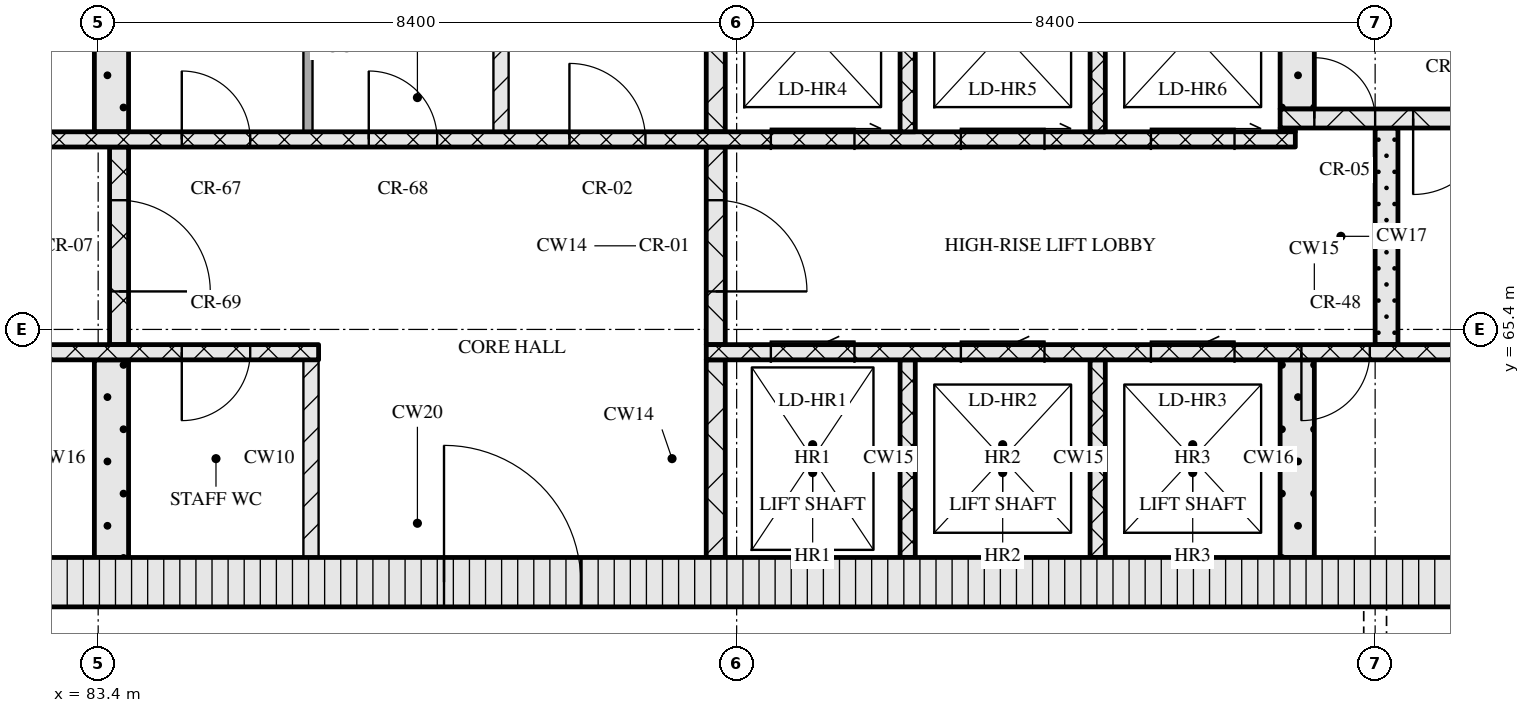
"""IFC4 building model, lengths in metres.
Left out: names, types, materials, properties, quantities, classifications, styles, units other than length and angle.
Written with IfcOpenShell. Run it as: python <this file> out.ifc"""

import sys

from ifc_helpers import new_model, si_unit, direction, frame, frame_2d, origin, place, context, subcontext, project, spatial, rectangle, extrude, element, fill, save


model = new_model("IFC4")
c1 = context("Model", 3, precision=1e-05, world=origin(), true_north=direction((0.0, 1.0)))
c2 = subcontext(c1, "Body", "Model", "MODEL_VIEW")
j1 = project(units=[si_unit("LENGTHUNIT", "METRE"), si_unit("PLANEANGLEUNIT", "RADIAN")], contexts=[c1])
p1 = place(None, origin())
s1 = spatial("IfcSite", under=j1, at=p1, CompositionType="ELEMENT")
p2 = place(p1, origin())
s2 = spatial("IfcBuilding", under=s1, at=p2, CompositionType="ELEMENT")
p3 = place(p2, frame((0.0, 0.0, 234.3)))
s3 = spatial("IfcBuildingStorey", under=s2, at=p3, CompositionType="ELEMENT", Elevation=234.3)
p4 = place(p3, frame((67.15, 62.075, 0.0), z_axis=(0.0, 0.0, 1.0), x_axis=(1.0, 0.0, 0.0)))
e1 = element("IfcWall", 1, at=p4, inside=s3, PredefinedType="SOLIDWALL", context=c2, shape_type="SweptSolid", body=[
    extrude(rectangle(XDim=40.9, YDim=0.65, at=frame_2d((20.45, 0.0))), origin(), (0.0, 0.0, 1.0), 3.32),
])
p5 = place(p4, frame((20.8, 0.0, 0.0)))
e2 = element("IfcOpeningElement", 2, at=p5, cuts=e1, PredefinedType="OPENING", context=c2, shape_type="SweptSolid", body=[
    extrude(rectangle(XDim=1.8, YDim=2.1, at=frame_2d((0.9, 1.05))), frame((0.0, 0.335, 0.0), z_axis=(0.0, -1.0, 0.0), x_axis=(1.0, 0.0, 0.0)), (0.0, 0.0, 1.0), 0.67),
])
p6 = place(p3, frame((83.575, 62.4, 0.0), z_axis=(0.0, 0.0, 1.0), x_axis=(0.0, 1.0, 0.0)))
e3 = element("IfcWall", 3, at=p6, inside=s3, PredefinedType="SOLIDWALL", context=c2, shape_type="SweptSolid", body=[
    extrude(rectangle(XDim=2.6, YDim=0.45, at=frame_2d((1.3, 0.0))), origin(), (0.0, 0.0, 1.0), 3.32),
])
p7 = place(p3, frame((86.2, 62.4, 0.0), z_axis=(0.0, 0.0, 1.0), x_axis=(0.0, 1.0, 0.0)))
e4 = element("IfcWall", 4, at=p7, inside=s3, PredefinedType="PARTITIONING", context=c2, shape_type="SweptSolid", body=[
    extrude(rectangle(XDim=2.6, YDim=0.2, at=frame_2d((1.3, 0.0))), origin(), (0.0, 0.0, 1.0), 3.32),
])
p8 = place(p3, frame((91.525, 62.4, 0.0), z_axis=(0.0, 0.0, 1.0), x_axis=(0.0, 1.0, 0.0)))
e5 = element("IfcWall", 5, at=p8, inside=s3, PredefinedType="SOLIDWALL", context=c2, shape_type="SweptSolid", body=[
    extrude(rectangle(XDim=2.6, YDim=0.25, at=frame_2d((1.3, 0.0))), origin(), (0.0, 0.0, 1.0), 3.32),
])
for number, where, z_axis, x_axis in (
    (6, (94.05, 62.4, 0.0), (0.0, 0.0, 1.0), (0.0, 1.0, 0.0)),
    (7, (96.55, 62.4, 0.0), (0.0, 0.0, 1.0), (0.0, 1.0, 0.0)),
):
    element("IfcWall", number, at=place(p3, frame(where, z_axis=z_axis, x_axis=x_axis)), inside=s3, PredefinedType="SOLIDWALL", context=c2, shape_type="SweptSolid", body=[
        extrude(rectangle(XDim=2.6, YDim=0.2, at=frame_2d((1.3, 0.0))), origin(), (0.0, 0.0, 1.0), 3.32),
    ])
p9 = place(p3, frame((99.175, 62.4, 0.0), z_axis=(0.0, 0.0, 1.0), x_axis=(0.0, 1.0, 0.0)))
e8 = element("IfcWall", 8, at=p9, inside=s3, PredefinedType="SOLIDWALL", context=c2, shape_type="SweptSolid", body=[
    extrude(rectangle(XDim=2.6, YDim=0.45, at=frame_2d((1.3, 0.0))), origin(), (0.0, 0.0, 1.0), 3.32),
])
p10 = place(p3, frame((67.8, 65.1, 0.0), z_axis=(0.0, 0.0, 1.0), x_axis=(1.0, 0.0, 0.0)))
e9 = element("IfcWall", 9, at=p10, inside=s3, PredefinedType="SOLIDWALL", context=c2, shape_type="SweptSolid", body=[
    extrude(rectangle(XDim=18.5, YDim=0.2, at=frame_2d((9.25, 0.0))), origin(), (0.0, 0.0, 1.0), 3.32),
])
p11 = place(p10, frame((7.27, 0.0, 0.0)))
e10 = element("IfcOpeningElement", 10, at=p11, cuts=e9, PredefinedType="OPENING", context=c2, shape_type="SweptSolid", body=[
    extrude(rectangle(XDim=0.9, YDim=2.1, at=frame_2d((0.45, 1.05))), frame((0.0, 0.11, 0.0), z_axis=(0.0, -1.0, 0.0), x_axis=(1.0, 0.0, 0.0)), (0.0, 0.0, 1.0), 0.22),
])
p12 = place(p10, frame((9.05, 0.0, 0.0)))
e11 = element("IfcOpeningElement", 11, at=p12, cuts=e9, PredefinedType="OPENING", context=c2, shape_type="SweptSolid", body=[
    extrude(rectangle(XDim=0.9, YDim=2.1, at=frame_2d((0.45, 1.05))), frame((0.0, 0.11, 0.0), z_axis=(0.0, -1.0, 0.0), x_axis=(1.0, 0.0, 0.0)), (0.0, 0.0, 1.0), 0.22),
])
p13 = place(p10, frame((12.76, 0.0, 0.0)))
e12 = element("IfcOpeningElement", 12, at=p13, cuts=e9, PredefinedType="OPENING", context=c2, shape_type="SweptSolid", body=[
    extrude(rectangle(XDim=0.9, YDim=2.1, at=frame_2d((0.45, 1.05))), frame((0.0, 0.11, 0.0), z_axis=(0.0, -1.0, 0.0), x_axis=(1.0, 0.0, 0.0)), (0.0, 0.0, 1.0), 0.22),
])
p14 = place(p10, frame((16.7, 0.0, 0.0)))
e13 = element("IfcOpeningElement", 13, at=p14, cuts=e9, PredefinedType="OPENING", context=c2, shape_type="SweptSolid", body=[
    extrude(rectangle(XDim=0.9, YDim=2.1, at=frame_2d((0.45, 1.05))), frame((0.0, 0.11, 0.0), z_axis=(0.0, -1.0, 0.0), x_axis=(1.0, 0.0, 0.0)), (0.0, 0.0, 1.0), 0.22),
])
p15 = place(p3, frame((91.4, 65.1, 0.0), z_axis=(0.0, 0.0, 1.0), x_axis=(1.0, 0.0, 0.0)))
e14 = element("IfcWall", 14, at=p15, inside=s3, PredefinedType="SOLIDWALL", context=c2, shape_type="SweptSolid", body=[
    extrude(rectangle(XDim=16.0, YDim=0.2, at=frame_2d((8.0, 0.0))), origin(), (0.0, 0.0, 1.0), 3.32),
])
p16 = place(p15, frame((0.85, 0.0, 0.0)))
e15 = element("IfcOpeningElement", 15, at=p16, cuts=e14, PredefinedType="OPENING", context=c2, shape_type="SweptSolid", body=[
    extrude(rectangle(XDim=1.1, YDim=2.1, at=frame_2d((0.55, 1.05))), frame((0.0, 0.11, 0.0), z_axis=(0.0, -1.0, 0.0), x_axis=(1.0, 0.0, 0.0)), (0.0, 0.0, 1.0), 0.22),
])
p17 = place(p15, frame((3.35, 0.0, 0.0)))
e16 = element("IfcOpeningElement", 16, at=p17, cuts=e14, PredefinedType="OPENING", context=c2, shape_type="SweptSolid", body=[
    extrude(rectangle(XDim=1.1, YDim=2.1, at=frame_2d((0.55, 1.05))), frame((0.0, 0.11, 0.0), z_axis=(0.0, -1.0, 0.0), x_axis=(1.0, 0.0, 0.0)), (0.0, 0.0, 1.0), 0.22),
])
p18 = place(p15, frame((5.85, 0.0, 0.0)))
e17 = element("IfcOpeningElement", 17, at=p18, cuts=e14, PredefinedType="OPENING", context=c2, shape_type="SweptSolid", body=[
    extrude(rectangle(XDim=1.1, YDim=2.1, at=frame_2d((0.55, 1.05))), frame((0.0, 0.11, 0.0), z_axis=(0.0, -1.0, 0.0), x_axis=(1.0, 0.0, 0.0)), (0.0, 0.0, 1.0), 0.22),
])
p19 = place(p15, frame((7.83, 0.0, 0.0)))
e18 = element("IfcOpeningElement", 18, at=p19, cuts=e14, PredefinedType="OPENING", context=c2, shape_type="SweptSolid", body=[
    extrude(rectangle(XDim=0.9, YDim=2.1, at=frame_2d((0.45, 1.05))), frame((0.0, 0.11, 0.0), z_axis=(0.0, -1.0, 0.0), x_axis=(1.0, 0.0, 0.0)), (0.0, 0.0, 1.0), 0.22),
])
p20 = place(p3, frame((83.675, 65.2, 0.0), z_axis=(0.0, 0.0, 1.0), x_axis=(0.0, 1.0, 0.0)))
e19 = element("IfcWall", 19, at=p20, inside=s3, PredefinedType="SOLIDWALL", context=c2, shape_type="SweptSolid", body=[
    extrude(rectangle(XDim=2.6, YDim=0.25, at=frame_2d((1.3, 0.0))), origin(), (0.0, 0.0, 1.0), 3.32),
])
p21 = place(p20, frame((0.7, 0.0, 0.0)))
e20 = element("IfcOpeningElement", 20, at=p21, cuts=e19, PredefinedType="OPENING", context=c2, shape_type="SweptSolid", body=[
    extrude(rectangle(XDim=1.2, YDim=2.1, at=frame_2d((0.6, 1.05))), frame((0.0, 0.135, 0.0), z_axis=(0.0, -1.0, 0.0), x_axis=(1.0, 0.0, 0.0)), (0.0, 0.0, 1.0), 0.27),
])
p22 = place(p3, frame((91.525, 65.2, 0.0), z_axis=(0.0, 0.0, 1.0), x_axis=(0.0, 1.0, 0.0)))
e21 = element("IfcWall", 21, at=p22, inside=s3, PredefinedType="SOLIDWALL", context=c2, shape_type="SweptSolid", body=[
    extrude(rectangle(XDim=2.6, YDim=0.25, at=frame_2d((1.3, 0.0))), origin(), (0.0, 0.0, 1.0), 3.32),
])
p23 = place(p22, frame((0.7, 0.0, 0.0)))
e22 = element("IfcOpeningElement", 22, at=p23, cuts=e21, PredefinedType="OPENING", context=c2, shape_type="SweptSolid", body=[
    extrude(rectangle(XDim=1.2, YDim=2.1, at=frame_2d((0.6, 1.05))), frame((0.0, 0.135, 0.0), z_axis=(0.0, -1.0, 0.0), x_axis=(1.0, 0.0, 0.0)), (0.0, 0.0, 1.0), 0.27),
])
p24 = place(p3, frame((100.35, 65.2, 0.0), z_axis=(0.0, 0.0, 1.0), x_axis=(0.0, 1.0, 0.0)))
e23 = element("IfcWall", 23, at=p24, inside=s3, PredefinedType="SOLIDWALL", context=c2, shape_type="SweptSolid", body=[
    extrude(rectangle(XDim=2.85, YDim=0.3, at=frame_2d((1.425, 0.0))), origin(), (0.0, 0.0, 1.0), 3.32),
])
p25 = place(p3, frame((76.05, 67.9, 0.0), z_axis=(0.0, 0.0, 1.0), x_axis=(1.0, 0.0, 0.0)))
e24 = element("IfcWall", 24, at=p25, inside=s3, PredefinedType="SOLIDWALL", context=c2, shape_type="SweptSolid", body=[
    extrude(rectangle(XDim=23.1, YDim=0.2, at=frame_2d((11.55, 0.0))), origin(), (0.0, 0.0, 1.0), 3.32),
])
p26 = place(p25, frame((1.35, 0.0, 0.0)))
e25 = element("IfcOpeningElement", 25, at=p26, cuts=e24, PredefinedType="OPENING", context=c2, shape_type="SweptSolid", body=[
    extrude(rectangle(XDim=0.9, YDim=2.1, at=frame_2d((0.45, 1.05))), frame((0.0, 0.11, 0.0), z_axis=(0.0, -1.0, 0.0), x_axis=(1.0, 0.0, 0.0)), (0.0, 0.0, 1.0), 0.22),
])
p27 = place(p25, frame((5.06, 0.0, 0.0)))
e26 = element("IfcOpeningElement", 26, at=p27, cuts=e24, PredefinedType="OPENING", context=c2, shape_type="SweptSolid", body=[
    extrude(rectangle(XDim=0.9, YDim=2.1, at=frame_2d((0.45, 1.05))), frame((0.0, 0.11, 0.0), z_axis=(0.0, -1.0, 0.0), x_axis=(1.0, 0.0, 0.0)), (0.0, 0.0, 1.0), 0.22),
])
p28 = place(p25, frame((8.45, 0.0, 0.0)))
e27 = element("IfcOpeningElement", 27, at=p28, cuts=e24, PredefinedType="OPENING", context=c2, shape_type="SweptSolid", body=[
    extrude(rectangle(XDim=0.9, YDim=2.1, at=frame_2d((0.45, 1.05))), frame((0.0, 0.11, 0.0), z_axis=(0.0, -1.0, 0.0), x_axis=(1.0, 0.0, 0.0)), (0.0, 0.0, 1.0), 0.22),
])
p29 = place(p25, frame((10.91, 0.0, 0.0)))
e28 = element("IfcOpeningElement", 28, at=p29, cuts=e24, PredefinedType="OPENING", context=c2, shape_type="SweptSolid", body=[
    extrude(rectangle(XDim=0.9, YDim=2.1, at=frame_2d((0.45, 1.05))), frame((0.0, 0.11, 0.0), z_axis=(0.0, -1.0, 0.0), x_axis=(1.0, 0.0, 0.0)), (0.0, 0.0, 1.0), 0.22),
])
p30 = place(p25, frame((13.55, 0.0, 0.0)))
e29 = element("IfcOpeningElement", 29, at=p30, cuts=e24, PredefinedType="OPENING", context=c2, shape_type="SweptSolid", body=[
    extrude(rectangle(XDim=1.0, YDim=2.1, at=frame_2d((0.5, 1.05))), frame((0.0, 0.11, 0.0), z_axis=(0.0, -1.0, 0.0), x_axis=(1.0, 0.0, 0.0)), (0.0, 0.0, 1.0), 0.22),
])
p31 = place(p25, frame((16.2, 0.0, 0.0)))
e30 = element("IfcOpeningElement", 30, at=p31, cuts=e24, PredefinedType="OPENING", context=c2, shape_type="SweptSolid", body=[
    extrude(rectangle(XDim=1.1, YDim=2.1, at=frame_2d((0.55, 1.05))), frame((0.0, 0.11, 0.0), z_axis=(0.0, -1.0, 0.0), x_axis=(1.0, 0.0, 0.0)), (0.0, 0.0, 1.0), 0.22),
])
p32 = place(p25, frame((18.7, 0.0, 0.0)))
e31 = element("IfcOpeningElement", 31, at=p32, cuts=e24, PredefinedType="OPENING", context=c2, shape_type="SweptSolid", body=[
    extrude(rectangle(XDim=1.1, YDim=2.1, at=frame_2d((0.55, 1.05))), frame((0.0, 0.11, 0.0), z_axis=(0.0, -1.0, 0.0), x_axis=(1.0, 0.0, 0.0)), (0.0, 0.0, 1.0), 0.22),
])
p33 = place(p25, frame((21.2, 0.0, 0.0)))
e32 = element("IfcOpeningElement", 32, at=p33, cuts=e24, PredefinedType="OPENING", context=c2, shape_type="SweptSolid", body=[
    extrude(rectangle(XDim=1.1, YDim=2.1, at=frame_2d((0.55, 1.05))), frame((0.0, 0.11, 0.0), z_axis=(0.0, -1.0, 0.0), x_axis=(1.0, 0.0, 0.0)), (0.0, 0.0, 1.0), 0.22),
])
p34 = place(p3, frame((83.575, 68.0, 0.0), z_axis=(0.0, 0.0, 1.0), x_axis=(0.0, 1.0, 0.0)))
e33 = element("IfcWall", 33, at=p34, inside=s3, PredefinedType="SOLIDWALL", context=c2, shape_type="SweptSolid", body=[
    extrude(rectangle(XDim=2.6, YDim=0.45, at=frame_2d((1.3, 0.0))), origin(), (0.0, 0.0, 1.0), 3.32),
])
p35 = place(p3, frame((86.16, 68.0, 0.0), z_axis=(0.0, 0.0, 1.0), x_axis=(0.0, 1.0, 0.0)))
e34 = element("IfcWall", 34, at=p35, inside=s3, PredefinedType="PARTITIONING", context=c2, shape_type="SweptSolid", body=[
    extrude(rectangle(XDim=2.6, YDim=0.12, at=frame_2d((1.3, 0.0))), origin(), (0.0, 0.0, 1.0), 3.32),
])
p36 = place(p3, frame((88.7, 68.0, 0.0), z_axis=(0.0, 0.0, 1.0), x_axis=(0.0, 1.0, 0.0)))
e35 = element("IfcWall", 35, at=p36, inside=s3, PredefinedType="PARTITIONING", context=c2, shape_type="SweptSolid", body=[
    extrude(rectangle(XDim=2.6, YDim=0.2, at=frame_2d((1.3, 0.0))), origin(), (0.0, 0.0, 1.0), 3.32),
])
p37 = place(p3, frame((91.525, 68.0, 0.0), z_axis=(0.0, 0.0, 1.0), x_axis=(0.0, 1.0, 0.0)))
e36 = element("IfcWall", 36, at=p37, inside=s3, PredefinedType="SOLIDWALL", context=c2, shape_type="SweptSolid", body=[
    extrude(rectangle(XDim=2.6, YDim=0.25, at=frame_2d((1.3, 0.0))), origin(), (0.0, 0.0, 1.0), 3.32),
])
for number, where, z_axis, x_axis in (
    (37, (94.05, 68.0, 0.0), (0.0, 0.0, 1.0), (0.0, 1.0, 0.0)),
    (38, (96.55, 68.0, 0.0), (0.0, 0.0, 1.0), (0.0, 1.0, 0.0)),
):
    element("IfcWall", number, at=place(p3, frame(where, z_axis=z_axis, x_axis=x_axis)), inside=s3, PredefinedType="SOLIDWALL", context=c2, shape_type="SweptSolid", body=[
        extrude(rectangle(XDim=2.6, YDim=0.2, at=frame_2d((1.3, 0.0))), origin(), (0.0, 0.0, 1.0), 3.32),
    ])
p38 = place(p3, frame((98.95, 68.025, 0.0), z_axis=(0.0, 0.0, 1.0), x_axis=(1.0, 0.0, 0.0)))
e39 = element("IfcWall", 39, at=p38, inside=s3, PredefinedType="SOLIDWALL", context=c2, shape_type="SweptSolid", body=[
    extrude(rectangle(XDim=0.2, YDim=0.05, at=frame_2d((0.1, 0.0))), origin(), (0.0, 0.0, 1.0), 3.32),
])
p39 = place(p3, frame((98.95, 68.175, 0.0), z_axis=(0.0, 0.0, 1.0), x_axis=(1.0, 0.0, 0.0)))
e40 = element("IfcWall", 40, at=p39, inside=s3, PredefinedType="SOLIDWALL", context=c2, shape_type="SweptSolid", body=[
    extrude(rectangle(XDim=8.45, YDim=0.25, at=frame_2d((4.225, 0.0))), origin(), (0.0, 0.0, 1.0), 3.32),
])
p40 = place(p39, frame((0.45, 0.0, 0.0)))
e41 = element("IfcOpeningElement", 41, at=p40, cuts=e40, PredefinedType="OPENING", context=c2, shape_type="SweptSolid", body=[
    extrude(rectangle(XDim=0.8, YDim=2.1, at=frame_2d((0.4, 1.05))), frame((0.0, 0.135, 0.0), z_axis=(0.0, -1.0, 0.0), x_axis=(1.0, 0.0, 0.0)), (0.0, 0.0, 1.0), 0.27),
])
p41 = place(p39, frame((1.75, 0.0, 0.0)))
e42 = element("IfcOpeningElement", 42, at=p41, cuts=e40, PredefinedType="OPENING", context=c2, shape_type="SweptSolid", body=[
    extrude(rectangle(XDim=1.0, YDim=2.1, at=frame_2d((0.5, 1.05))), frame((0.0, 0.135, 0.0), z_axis=(0.0, -1.0, 0.0), x_axis=(1.0, 0.0, 0.0)), (0.0, 0.0, 1.0), 0.27),
])
p42 = place(p3, frame((99.175, 68.3, 0.0), z_axis=(0.0, 0.0, 1.0), x_axis=(0.0, 1.0, 0.0)))
e43 = element("IfcWall", 43, at=p42, inside=s3, PredefinedType="SOLIDWALL", context=c2, shape_type="SweptSolid", body=[
    extrude(rectangle(XDim=2.3, YDim=0.45, at=frame_2d((1.15, 0.0))), origin(), (0.0, 0.0, 1.0), 3.32),
])
p43 = place(p5, origin())
e44 = element("IfcDoor", 44, at=p43, inside=s3, OperationType="DOUBLE_DOOR_SINGLE_SWING", PredefinedType="DOOR", context=c2, shape_type="SweptSolid", body=[
    extrude(rectangle(XDim=1.8, YDim=2.1, at=frame_2d((0.9, 1.05))), frame((0.0, 0.025, 0.0), z_axis=(0.0, -1.0, 0.0), x_axis=(1.0, 0.0, 0.0)), (0.0, 0.0, 1.0), 0.05),
])
fill(e2, e44)
p44 = place(p14, origin())
e45 = element("IfcDoor", 45, at=p44, inside=s3, OperationType="SINGLE_SWING_RIGHT", PredefinedType="DOOR", context=c2, shape_type="SweptSolid", body=[
    extrude(rectangle(XDim=0.9, YDim=2.1, at=frame_2d((0.45, 1.05))), frame((0.0, 0.025, 0.0), z_axis=(0.0, -1.0, 0.0), x_axis=(1.0, 0.0, 0.0)), (0.0, 0.0, 1.0), 0.05),
])
fill(e13, e45)
p45 = place(p16, origin())
e46 = element("IfcDoor", 46, at=p45, inside=s3, OperationType="SLIDING_TO_LEFT", PredefinedType="DOOR", context=c2, shape_type="SweptSolid", body=[
    extrude(rectangle(XDim=1.1, YDim=2.1, at=frame_2d((0.55, 1.05))), frame((0.0, 0.025, 0.0), z_axis=(0.0, -1.0, 0.0), x_axis=(1.0, 0.0, 0.0)), (0.0, 0.0, 1.0), 0.05),
])
fill(e15, e46)
p46 = place(p17, origin())
e47 = element("IfcDoor", 47, at=p46, inside=s3, OperationType="SLIDING_TO_LEFT", PredefinedType="DOOR", context=c2, shape_type="SweptSolid", body=[
    extrude(rectangle(XDim=1.1, YDim=2.1, at=frame_2d((0.55, 1.05))), frame((0.0, 0.025, 0.0), z_axis=(0.0, -1.0, 0.0), x_axis=(1.0, 0.0, 0.0)), (0.0, 0.0, 1.0), 0.05),
])
fill(e16, e47)
p47 = place(p18, origin())
e48 = element("IfcDoor", 48, at=p47, inside=s3, OperationType="SLIDING_TO_LEFT", PredefinedType="DOOR", context=c2, shape_type="SweptSolid", body=[
    extrude(rectangle(XDim=1.1, YDim=2.1, at=frame_2d((0.55, 1.05))), frame((0.0, 0.025, 0.0), z_axis=(0.0, -1.0, 0.0), x_axis=(1.0, 0.0, 0.0)), (0.0, 0.0, 1.0), 0.05),
])
fill(e17, e48)
p48 = place(p19, origin())
e49 = element("IfcDoor", 49, at=p48, inside=s3, OperationType="SINGLE_SWING_RIGHT", PredefinedType="DOOR", context=c2, shape_type="SweptSolid", body=[
    extrude(rectangle(XDim=0.9, YDim=2.1, at=frame_2d((0.45, 1.05))), frame((0.0, 0.025, 0.0), z_axis=(0.0, -1.0, 0.0), x_axis=(1.0, 0.0, 0.0)), (0.0, 0.0, 1.0), 0.05),
])
fill(e18, e49)
p49 = place(p21, origin())
e50 = element("IfcDoor", 50, at=p49, inside=s3, OperationType="SINGLE_SWING_RIGHT", PredefinedType="DOOR", context=c2, shape_type="SweptSolid", body=[
    extrude(rectangle(XDim=1.2, YDim=2.1, at=frame_2d((0.6, 1.05))), frame((0.0, 0.025, 0.0), z_axis=(0.0, -1.0, 0.0), x_axis=(1.0, 0.0, 0.0)), (0.0, 0.0, 1.0), 0.05),
])
fill(e20, e50)
p50 = place(p23, origin())
e51 = element("IfcDoor", 51, at=p50, inside=s3, OperationType="SINGLE_SWING_RIGHT", PredefinedType="DOOR", context=c2, shape_type="SweptSolid", body=[
    extrude(rectangle(XDim=1.2, YDim=2.1, at=frame_2d((0.6, 1.05))), frame((0.0, 0.025, 0.0), z_axis=(0.0, -1.0, 0.0), x_axis=(1.0, 0.0, 0.0)), (0.0, 0.0, 1.0), 0.05),
])
fill(e22, e51)
p51 = place(p28, origin())
e52 = element("IfcDoor", 52, at=p51, inside=s3, OperationType="SINGLE_SWING_LEFT", PredefinedType="DOOR", context=c2, shape_type="SweptSolid", body=[
    extrude(rectangle(XDim=0.9, YDim=2.1, at=frame_2d((0.45, 1.05))), frame((0.0, 0.025, 0.0), z_axis=(0.0, -1.0, 0.0), x_axis=(1.0, 0.0, 0.0)), (0.0, 0.0, 1.0), 0.05),
])
fill(e27, e52)
p52 = place(p29, origin())
e53 = element("IfcDoor", 53, at=p52, inside=s3, OperationType="SINGLE_SWING_LEFT", PredefinedType="DOOR", context=c2, shape_type="SweptSolid", body=[
    extrude(rectangle(XDim=0.9, YDim=2.1, at=frame_2d((0.45, 1.05))), frame((0.0, 0.025, 0.0), z_axis=(0.0, -1.0, 0.0), x_axis=(1.0, 0.0, 0.0)), (0.0, 0.0, 1.0), 0.05),
])
fill(e28, e53)
p53 = place(p30, origin())
e54 = element("IfcDoor", 54, at=p53, inside=s3, OperationType="SINGLE_SWING_LEFT", PredefinedType="DOOR", context=c2, shape_type="SweptSolid", body=[
    extrude(rectangle(XDim=1.0, YDim=2.1, at=frame_2d((0.5, 1.05))), frame((0.0, 0.025, 0.0), z_axis=(0.0, -1.0, 0.0), x_axis=(1.0, 0.0, 0.0)), (0.0, 0.0, 1.0), 0.05),
])
fill(e29, e54)
p54 = place(p31, origin())
e55 = element("IfcDoor", 55, at=p54, inside=s3, OperationType="SLIDING_TO_RIGHT", PredefinedType="DOOR", context=c2, shape_type="SweptSolid", body=[
    extrude(rectangle(XDim=1.1, YDim=2.1, at=frame_2d((0.55, 1.05))), frame((0.0, 0.025, 0.0), z_axis=(0.0, -1.0, 0.0), x_axis=(1.0, 0.0, 0.0)), (0.0, 0.0, 1.0), 0.05),
])
fill(e30, e55)
p55 = place(p32, origin())
e56 = element("IfcDoor", 56, at=p55, inside=s3, OperationType="SLIDING_TO_RIGHT", PredefinedType="DOOR", context=c2, shape_type="SweptSolid", body=[
    extrude(rectangle(XDim=1.1, YDim=2.1, at=frame_2d((0.55, 1.05))), frame((0.0, 0.025, 0.0), z_axis=(0.0, -1.0, 0.0), x_axis=(1.0, 0.0, 0.0)), (0.0, 0.0, 1.0), 0.05),
])
fill(e31, e56)
p56 = place(p33, origin())
e57 = element("IfcDoor", 57, at=p56, inside=s3, OperationType="SLIDING_TO_RIGHT", PredefinedType="DOOR", context=c2, shape_type="SweptSolid", body=[
    extrude(rectangle(XDim=1.1, YDim=2.1, at=frame_2d((0.55, 1.05))), frame((0.0, 0.025, 0.0), z_axis=(0.0, -1.0, 0.0), x_axis=(1.0, 0.0, 0.0)), (0.0, 0.0, 1.0), 0.05),
])
fill(e32, e57)
p57 = place(p40, origin())
e58 = element("IfcDoor", 58, at=p57, inside=s3, OperationType="SINGLE_SWING_LEFT", PredefinedType="DOOR", context=c2, shape_type="SweptSolid", body=[
    extrude(rectangle(XDim=0.8, YDim=2.1, at=frame_2d((0.4, 1.05))), frame((0.0, 0.025, 0.0), z_axis=(0.0, -1.0, 0.0), x_axis=(1.0, 0.0, 0.0)), (0.0, 0.0, 1.0), 0.05),
])
fill(e41, e58)
p58 = place(p41, origin())
e59 = element("IfcDoor", 59, at=p58, inside=s3, OperationType="SINGLE_SWING_RIGHT", PredefinedType="DOOR", context=c2, shape_type="SweptSolid", body=[
    extrude(rectangle(XDim=1.0, YDim=2.1, at=frame_2d((0.5, 1.05))), frame((0.0, 0.025, 0.0), z_axis=(0.0, -1.0, 0.0), x_axis=(1.0, 0.0, 0.0)), (0.0, 0.0, 1.0), 0.05),
])
fill(e42, e59)
save(model, sys.argv[1])
